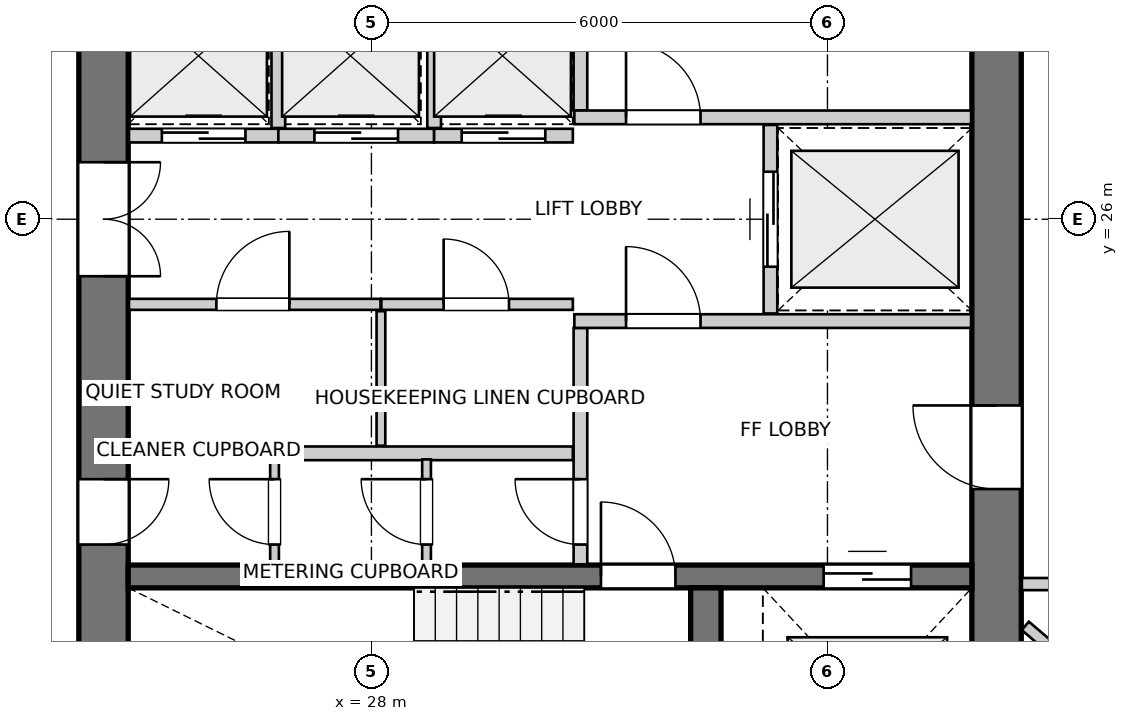
"""IFC4 building model, lengths in metres.
Left out: names, types, materials, properties, quantities, classifications, styles, units other than length and angle.
Written with IfcOpenShell. Run it as: python <this file> out.ifc"""

import sys

from ifc_helpers import new_model, si_unit, direction, frame, frame_2d, origin, place, context, subcontext, project, spatial, rectangle, extrude, source, transform, mapped, element, fill, save


model = new_model("IFC4")
c1 = context("Model", 3, precision=1e-05, world=origin(), true_north=direction((0.0, 1.0)))
c2 = subcontext(c1, "Body", "Model", "MODEL_VIEW")
j1 = project(units=[si_unit("LENGTHUNIT", "METRE"), si_unit("PLANEANGLEUNIT", "RADIAN")], contexts=[c1])
p1 = place(None, origin())
s1 = spatial("IfcSite", under=j1, at=p1, CompositionType="ELEMENT")
p2 = place(p1, origin())
s2 = spatial("IfcBuilding", under=s1, at=p2, CompositionType="ELEMENT")
p3 = place(p2, frame((0.0, 0.0, 187.4)))
s3 = spatial("IfcBuildingStorey", under=s2, at=p3, CompositionType="ELEMENT", Elevation=187.4)
p4 = place(p3, frame((24.475, 33.8, 0.0), z_axis=(0.0, 0.0, 1.0), x_axis=(0.0, -1.0, 0.0)))
e1 = element("IfcWall", 1, at=p4, inside=s3, PredefinedType="SHEAR", context=c2, shape_type="SweptSolid", body=[
    extrude(rectangle(XDim=15.6, YDim=0.65, at=frame_2d((7.8, 0.0))), origin(), (0.0, 0.0, 1.0), 2.9),
])
p5 = place(p4, frame((7.05, 0.0, 0.0)))
e2 = element("IfcOpeningElement", 2, at=p5, cuts=e1, PredefinedType="OPENING", context=c2, shape_type="SweptSolid", body=[
    extrude(rectangle(XDim=1.5, YDim=2.15, at=frame_2d((0.75, 1.075))), frame((0.0, 0.335, 0.0), z_axis=(0.0, -1.0, 0.0), x_axis=(1.0, 0.0, 0.0)), (0.0, 0.0, 1.0), 0.67),
])
p6 = place(p4, frame((3.52, 0.0, 0.0)))
e3 = element("IfcOpeningElement", 3, at=p6, cuts=e1, PredefinedType="OPENING", context=c2, shape_type="SweptSolid", body=[
    extrude(rectangle(XDim=0.86, YDim=2.05, at=frame_2d((0.43, 1.025))), frame((0.0, 0.335, 0.0), z_axis=(0.0, -1.0, 0.0), x_axis=(1.0, 0.0, 0.0)), (0.0, 0.0, 1.0), 0.67),
])
p7 = place(p4, frame((11.22, 0.0, 0.0)))
e4 = element("IfcOpeningElement", 4, at=p7, cuts=e1, PredefinedType="OPENING", context=c2, shape_type="SweptSolid", body=[
    extrude(rectangle(XDim=0.86, YDim=2.05, at=frame_2d((0.43, 1.025))), frame((0.0, 0.335, 0.0), z_axis=(0.0, -1.0, 0.0), x_axis=(1.0, 0.0, 0.0)), (0.0, 0.0, 1.0), 0.67),
])
p8 = place(p3, frame((36.225, 18.2, 0.0), z_axis=(0.0, 0.0, 1.0), x_axis=(0.0, 1.0, 0.0)))
e5 = element("IfcWall", 5, at=p8, inside=s3, PredefinedType="SHEAR", context=c2, shape_type="SweptSolid", body=[
    extrude(rectangle(XDim=15.6, YDim=0.65, at=frame_2d((7.8, 0.0))), origin(), (0.0, 0.0, 1.0), 2.9),
])
p9 = place(p8, frame((4.25, 0.0, 0.0)))
e6 = element("IfcOpeningElement", 6, at=p9, cuts=e5, PredefinedType="OPENING", context=c2, shape_type="SweptSolid", body=[
    extrude(rectangle(XDim=1.1, YDim=2.15, at=frame_2d((0.55, 1.075))), frame((0.0, 0.335, 0.0), z_axis=(0.0, -1.0, 0.0), x_axis=(1.0, 0.0, 0.0)), (0.0, 0.0, 1.0), 0.67),
])
p10 = place(p8, frame((10.25, 0.0, 0.0)))
e7 = element("IfcOpeningElement", 7, at=p10, cuts=e5, PredefinedType="OPENING", context=c2, shape_type="SweptSolid", body=[
    extrude(rectangle(XDim=1.1, YDim=2.15, at=frame_2d((0.55, 1.075))), frame((0.0, 0.335, 0.0), z_axis=(0.0, -1.0, 0.0), x_axis=(1.0, 0.0, 0.0)), (0.0, 0.0, 1.0), 0.67),
])
p11 = place(p3, frame((24.8, 21.3, 0.0), z_axis=(0.0, 0.0, 1.0), x_axis=(1.0, 0.0, 0.0)))
e8 = element("IfcWall", 8, at=p11, inside=s3, PredefinedType="SHEAR", context=c2, shape_type="SweptSolid", body=[
    extrude(rectangle(XDim=11.1, YDim=0.3, at=frame_2d((5.55, 0.0))), origin(), (0.0, 0.0, 1.0), 2.9),
])
p12 = place(p11, frame((6.22, 0.0, 0.0)))
e9 = element("IfcOpeningElement", 9, at=p12, cuts=e8, PredefinedType="OPENING", context=c2, shape_type="SweptSolid", body=[
    extrude(rectangle(XDim=0.98, YDim=2.15, at=frame_2d((0.49, 1.075))), frame((0.0, 0.16, 0.0), z_axis=(0.0, -1.0, 0.0), x_axis=(1.0, 0.0, 0.0)), (0.0, 0.0, 1.0), 0.32),
])
p13 = place(p11, frame((9.15, 0.0, 0.0)))
e10 = element("IfcOpeningElement", 10, at=p13, cuts=e8, PredefinedType="OPENING", context=c2, shape_type="SweptSolid", body=[
    extrude(rectangle(XDim=1.15, YDim=2.15, at=frame_2d((0.575, 1.075))), frame((0.0, 0.16, 0.0), z_axis=(0.0, -1.0, 0.0), x_axis=(1.0, 0.0, 0.0)), (0.0, 0.0, 1.0), 0.32),
])
p14 = place(p3, frame((32.4, 18.2, 0.0), z_axis=(0.0, 0.0, 1.0), x_axis=(0.0, 1.0, 0.0)))
e11 = element("IfcWall", 11, at=p14, inside=s3, PredefinedType="SHEAR", context=c2, shape_type="SweptSolid", body=[
    extrude(rectangle(XDim=2.95, YDim=0.4, at=frame_2d((1.475, 0.0))), origin(), (0.0, 0.0, 1.0), 2.9),
])
p15 = place(p3, frame((30.75, 21.46, 0.0), z_axis=(0.0, 0.0, 1.0), x_axis=(0.0, 1.0, 0.0)))
e12 = element("IfcWall", 12, at=p15, inside=s3, PredefinedType="PARTITIONING", context=c2, shape_type="SweptSolid", body=[
    extrude(rectangle(XDim=3.11, YDim=0.18, at=frame_2d((1.555, 0.0))), origin(), (0.0, 0.0, 1.0), 2.9),
])
p16 = place(p15, frame((0.26, 0.0, 0.0)))
e13 = element("IfcOpeningElement", 13, at=p16, cuts=e12, PredefinedType="OPENING", context=c2, shape_type="SweptSolid", body=[
    extrude(rectangle(XDim=0.86, YDim=2.05, at=frame_2d((0.43, 1.025))), frame((0.0, 0.1, 0.0), z_axis=(0.0, -1.0, 0.0), x_axis=(1.0, 0.0, 0.0)), (0.0, 0.0, 1.0), 0.2),
])
p17 = place(p3, frame((30.67, 24.66, 0.0), z_axis=(0.0, 0.0, 1.0), x_axis=(1.0, 0.0, 0.0)))
e14 = element("IfcWall", 14, at=p17, inside=s3, PredefinedType="PARTITIONING", context=c2, shape_type="SweptSolid", body=[
    extrude(rectangle(XDim=5.22, YDim=0.18, at=frame_2d((2.61, 0.0))), origin(), (0.0, 0.0, 1.0), 2.9),
])
p18 = place(p17, frame((0.68, 0.0, 0.0)))
e15 = element("IfcOpeningElement", 15, at=p18, cuts=e14, PredefinedType="OPENING", context=c2, shape_type="SweptSolid", body=[
    extrude(rectangle(XDim=0.98, YDim=2.15, at=frame_2d((0.49, 1.075))), frame((0.0, 0.1, 0.0), z_axis=(0.0, -1.0, 0.0), x_axis=(1.0, 0.0, 0.0)), (0.0, 0.0, 1.0), 0.2),
])
p19 = place(p3, frame((30.75, 27.43, 0.0), z_axis=(0.0, 0.0, 1.0), x_axis=(0.0, 1.0, 0.0)))
e16 = element("IfcWall", 16, at=p19, inside=s3, PredefinedType="PARTITIONING", context=c2, shape_type="SweptSolid", body=[
    extrude(rectangle(XDim=3.11, YDim=0.18, at=frame_2d((1.555, 0.0))), origin(), (0.0, 0.0, 1.0), 2.9),
])
p20 = place(p19, frame((1.98, 0.0, 0.0)))
e17 = element("IfcOpeningElement", 17, at=p20, cuts=e16, PredefinedType="OPENING", context=c2, shape_type="SweptSolid", body=[
    extrude(rectangle(XDim=0.86, YDim=2.05, at=frame_2d((0.43, 1.025))), frame((0.0, 0.1, 0.0), z_axis=(0.0, -1.0, 0.0), x_axis=(1.0, 0.0, 0.0)), (0.0, 0.0, 1.0), 0.2),
])
p21 = place(p3, frame((30.67, 27.34, 0.0), z_axis=(0.0, 0.0, 1.0), x_axis=(1.0, 0.0, 0.0)))
e18 = element("IfcWall", 18, at=p21, inside=s3, PredefinedType="PARTITIONING", context=c2, shape_type="SweptSolid", body=[
    extrude(rectangle(XDim=5.22, YDim=0.18, at=frame_2d((2.61, 0.0))), origin(), (0.0, 0.0, 1.0), 2.9),
])
p22 = place(p21, frame((0.68, 0.0, 0.0)))
e19 = element("IfcOpeningElement", 19, at=p22, cuts=e18, PredefinedType="OPENING", context=c2, shape_type="SweptSolid", body=[
    extrude(rectangle(XDim=0.98, YDim=2.15, at=frame_2d((0.49, 1.075))), frame((0.0, 0.1, 0.0), z_axis=(0.0, -1.0, 0.0), x_axis=(1.0, 0.0, 0.0)), (0.0, 0.0, 1.0), 0.2),
])
p23 = place(p3, frame((33.25, 24.76, 0.0), z_axis=(0.0, 0.0, 1.0), x_axis=(0.0, 1.0, 0.0)))
e20 = element("IfcWall", 20, at=p23, inside=s3, PredefinedType="PARTITIONING", context=c2, shape_type="SweptSolid", body=[
    extrude(rectangle(XDim=2.48, YDim=0.18, at=frame_2d((1.24, 0.0))), origin(), (0.0, 0.0, 1.0), 2.9),
])
p24 = place(p23, frame((0.615, 0.0, 0.0)))
e21 = element("IfcOpeningElement", 21, at=p24, cuts=e20, PredefinedType="OPENING", context=c2, shape_type="SweptSolid", body=[
    extrude(rectangle(XDim=1.25, YDim=2.15, at=frame_2d((0.625, 1.075))), frame((0.0, 0.1, 0.0), z_axis=(0.0, -1.0, 0.0), x_axis=(1.0, 0.0, 0.0)), (0.0, 0.0, 1.0), 0.2),
])
p25 = place(p3, frame((24.81, 22.92, 0.0), z_axis=(0.0, 0.0, 1.0), x_axis=(1.0, 0.0, 0.0)))
e22 = element("IfcWall", 22, at=p25, inside=s3, PredefinedType="PARTITIONING", context=c2, shape_type="SweptSolid", body=[
    extrude(rectangle(XDim=5.84, YDim=0.18, at=frame_2d((2.92, 0.0))), origin(), (0.0, 0.0, 1.0), 2.9),
])
p26 = place(p3, frame((24.81, 24.88, 0.0), z_axis=(0.0, 0.0, 1.0), x_axis=(1.0, 0.0, 0.0)))
e23 = element("IfcWall", 23, at=p26, inside=s3, PredefinedType="PARTITIONING", context=c2, shape_type="SweptSolid", body=[
    extrude(rectangle(XDim=3.31, YDim=0.145, at=frame_2d((1.655, 0.0))), origin(), (0.0, 0.0, 1.0), 2.9),
])
p27 = place(p26, frame((1.15, 0.0, 0.0)))
e24 = element("IfcOpeningElement", 24, at=p27, cuts=e23, PredefinedType="OPENING", context=c2, shape_type="SweptSolid", body=[
    extrude(rectangle(XDim=0.96, YDim=2.1, at=frame_2d((0.48, 1.05))), frame((0.0, 0.083, 0.0), z_axis=(0.0, -1.0, 0.0), x_axis=(1.0, 0.0, 0.0)), (0.0, 0.0, 1.0), 0.165),
])
p28 = place(p3, frame((28.13, 24.88, 0.0), z_axis=(0.0, 0.0, 1.0), x_axis=(1.0, 0.0, 0.0)))
e25 = element("IfcWall", 25, at=p28, inside=s3, PredefinedType="PARTITIONING", context=c2, shape_type="SweptSolid", body=[
    extrude(rectangle(XDim=2.52, YDim=0.145, at=frame_2d((1.26, 0.0))), origin(), (0.0, 0.0, 1.0), 2.9),
])
p29 = place(p28, frame((0.82, 0.0, 0.0)))
e26 = element("IfcOpeningElement", 26, at=p29, cuts=e25, PredefinedType="OPENING", context=c2, shape_type="SweptSolid", body=[
    extrude(rectangle(XDim=0.86, YDim=2.05, at=frame_2d((0.43, 1.025))), frame((0.0, 0.083, 0.0), z_axis=(0.0, -1.0, 0.0), x_axis=(1.0, 0.0, 0.0)), (0.0, 0.0, 1.0), 0.165),
])
p30 = place(p3, frame((28.125, 23.02, 0.0), z_axis=(0.0, 0.0, 1.0), x_axis=(0.0, 1.0, 0.0)))
e27 = element("IfcWall", 27, at=p30, inside=s3, PredefinedType="PARTITIONING", context=c2, shape_type="SweptSolid", body=[
    extrude(rectangle(XDim=1.77, YDim=0.115, at=frame_2d((0.885, 0.0))), origin(), (0.0, 0.0, 1.0), 2.9),
])
p31 = place(p3, frame((24.81, 27.1, 0.0), z_axis=(0.0, 0.0, 1.0), x_axis=(1.0, 0.0, 0.0)))
e28 = element("IfcWall", 28, at=p31, inside=s3, PredefinedType="PARTITIONING", context=c2, shape_type="SweptSolid", body=[
    extrude(rectangle(XDim=1.965, YDim=0.18, at=frame_2d((0.982, 0.0))), origin(), (0.0, 0.0, 1.0), 2.9),
])
p32 = place(p31, frame((0.433, 0.0, 0.0)))
e29 = element("IfcOpeningElement", 29, at=p32, cuts=e28, PredefinedType="OPENING", context=c2, shape_type="SweptSolid", body=[
    extrude(rectangle(XDim=1.1, YDim=2.15, at=frame_2d((0.55, 1.075))), frame((0.0, 0.1, 0.0), z_axis=(0.0, -1.0, 0.0), x_axis=(1.0, 0.0, 0.0)), (0.0, 0.0, 1.0), 0.2),
])
p33 = place(p3, frame((26.775, 27.1, 0.0), z_axis=(0.0, 0.0, 1.0), x_axis=(1.0, 0.0, 0.0)))
e30 = element("IfcWall", 30, at=p33, inside=s3, PredefinedType="PARTITIONING", context=c2, shape_type="SweptSolid", body=[
    extrude(rectangle(XDim=2.05, YDim=0.18, at=frame_2d((1.025, 0.0))), origin(), (0.0, 0.0, 1.0), 2.9),
])
p34 = place(p33, frame((0.475, 0.0, 0.0)))
e31 = element("IfcOpeningElement", 31, at=p34, cuts=e30, PredefinedType="OPENING", context=c2, shape_type="SweptSolid", body=[
    extrude(rectangle(XDim=1.1, YDim=2.15, at=frame_2d((0.55, 1.075))), frame((0.0, 0.1, 0.0), z_axis=(0.0, -1.0, 0.0), x_axis=(1.0, 0.0, 0.0)), (0.0, 0.0, 1.0), 0.2),
])
p35 = place(p3, frame((26.775, 27.2, 0.0), z_axis=(0.0, 0.0, 1.0), x_axis=(0.0, 1.0, 0.0)))
e32 = element("IfcWall", 32, at=p35, inside=s3, PredefinedType="PARTITIONING", context=c2, shape_type="SweptSolid", body=[
    extrude(rectangle(XDim=1.78, YDim=0.18, at=frame_2d((0.89, 0.0))), origin(), (0.0, 0.0, 1.0), 2.9),
])
p36 = place(p3, frame((28.825, 27.1, 0.0), z_axis=(0.0, 0.0, 1.0), x_axis=(1.0, 0.0, 0.0)))
e33 = element("IfcWall", 33, at=p36, inside=s3, PredefinedType="PARTITIONING", context=c2, shape_type="SweptSolid", body=[
    extrude(rectangle(XDim=1.825, YDim=0.18, at=frame_2d((0.913, 0.0))), origin(), (0.0, 0.0, 1.0), 2.9),
])
p37 = place(p36, frame((0.363, 0.0, 0.0)))
e34 = element("IfcOpeningElement", 34, at=p37, cuts=e33, PredefinedType="OPENING", context=c2, shape_type="SweptSolid", body=[
    extrude(rectangle(XDim=1.1, YDim=2.15, at=frame_2d((0.55, 1.075))), frame((0.0, 0.1, 0.0), z_axis=(0.0, -1.0, 0.0), x_axis=(1.0, 0.0, 0.0)), (0.0, 0.0, 1.0), 0.2),
])
p38 = place(p3, frame((28.825, 27.2, 0.0), z_axis=(0.0, 0.0, 1.0), x_axis=(0.0, 1.0, 0.0)))
e35 = element("IfcWall", 35, at=p38, inside=s3, PredefinedType="PARTITIONING", context=c2, shape_type="SweptSolid", body=[
    extrude(rectangle(XDim=1.78, YDim=0.18, at=frame_2d((0.89, 0.0))), origin(), (0.0, 0.0, 1.0), 2.9),
])
p39 = place(p3, frame((26.725, 21.46, 0.0), z_axis=(0.0, 0.0, 1.0), x_axis=(0.0, 1.0, 0.0)))
e36 = element("IfcWall", 36, at=p39, inside=s3, PredefinedType="PARTITIONING", context=c2, shape_type="SweptSolid", body=[
    extrude(rectangle(XDim=1.38, YDim=0.115, at=frame_2d((0.69, 0.0))), origin(), (0.0, 0.0, 1.0), 2.9),
])
p40 = place(p39, frame((0.26, 0.0, 0.0)))
e37 = element("IfcOpeningElement", 37, at=p40, cuts=e36, PredefinedType="OPENING", context=c2, shape_type="SweptSolid", body=[
    extrude(rectangle(XDim=0.86, YDim=2.05, at=frame_2d((0.43, 1.025))), frame((0.0, 0.067, 0.0), z_axis=(0.0, -1.0, 0.0), x_axis=(1.0, 0.0, 0.0)), (0.0, 0.0, 1.0), 0.135),
])
p41 = place(p3, frame((28.725, 21.46, 0.0), z_axis=(0.0, 0.0, 1.0), x_axis=(0.0, 1.0, 0.0)))
e38 = element("IfcWall", 38, at=p41, inside=s3, PredefinedType="PARTITIONING", context=c2, shape_type="SweptSolid", body=[
    extrude(rectangle(XDim=1.38, YDim=0.115, at=frame_2d((0.69, 0.0))), origin(), (0.0, 0.0, 1.0), 2.9),
])
p42 = place(p41, frame((0.26, 0.0, 0.0)))
e39 = element("IfcOpeningElement", 39, at=p42, cuts=e38, PredefinedType="OPENING", context=c2, shape_type="SweptSolid", body=[
    extrude(rectangle(XDim=0.86, YDim=2.05, at=frame_2d((0.43, 1.025))), frame((0.0, 0.067, 0.0), z_axis=(0.0, -1.0, 0.0), x_axis=(1.0, 0.0, 0.0)), (0.0, 0.0, 1.0), 0.135),
])
p43 = place(p3, frame((38.33, 21.2, 0.0), z_axis=(0.0, 0.0, 1.0), x_axis=(-1.0, 0.0, 0.0)))
e40 = element("IfcWall", 40, at=p43, inside=s3, PredefinedType="PARTITIONING", context=c2, shape_type="SweptSolid", body=[
    extrude(rectangle(XDim=1.772, YDim=0.16, at=frame_2d((0.886, 0.0))), origin(), (0.0, 0.0, 1.0), 2.9),
])
p44 = place(p43, frame((0.41, 0.0, 0.0)))
e41 = element("IfcOpeningElement", 41, at=p44, cuts=e40, PredefinedType="OPENING", context=c2, shape_type="SweptSolid", body=[
    extrude(rectangle(XDim=0.96, YDim=2.1, at=frame_2d((0.48, 1.05))), frame((0.0, 0.09, 0.0), z_axis=(0.0, -1.0, 0.0), x_axis=(1.0, 0.0, 0.0)), (0.0, 0.0, 1.0), 0.18),
])
p45 = place(p3, frame((36.603, 20.65, 0.0), z_axis=(0.0, 0.0, 1.0), x_axis=(0.759924803985, -0.650010993975, 0.0)))
e42 = element("IfcWall", 42, at=p45, inside=s3, PredefinedType="PARTITIONING", context=c2, shape_type="SweptSolid", body=[
    extrude(rectangle(XDim=7.294, YDim=0.145, at=frame_2d((3.647, 0.0))), origin(), (0.0, 0.0, 1.0), 2.9),
])
m1 = source(origin(), c2, "Body", "SweptSolid", [
    extrude(rectangle(XDim=0.98, YDim=2.15, at=frame_2d((0.49, 1.075))), frame((0.0, 0.025, 0.0), z_axis=(0.0, -1.0, 0.0), x_axis=(1.0, 0.0, 0.0)), (0.0, 0.0, 1.0), 0.05),
])
p46 = place(p12, origin())
e43 = element("IfcDoor", 43, at=p46, inside=s3, OperationType="SINGLE_SWING_LEFT", PredefinedType="DOOR", context=c2, shape_type="MappedRepresentation", body=[
    mapped(m1, transform((0.0, 0.0, 0.0), x_axis=(1.0, 0.0, 0.0), y_axis=(0.0, 1.0, 0.0), z_axis=(0.0, 0.0, 1.0), scale=1.0)),
])
fill(e9, e43)
m2 = source(origin(), c2, "Body", "SweptSolid", [
    extrude(rectangle(XDim=1.15, YDim=2.15, at=frame_2d((0.575, 1.075))), frame((0.0, 0.025, 0.0), z_axis=(0.0, -1.0, 0.0), x_axis=(1.0, 0.0, 0.0)), (0.0, 0.0, 1.0), 0.05),
])
p47 = place(p13, origin())
e44 = element("IfcDoor", 44, at=p47, inside=s3, OperationType="DOUBLE_DOOR_SLIDING", PredefinedType="DOOR", context=c2, shape_type="MappedRepresentation", body=[
    mapped(m2, transform((0.0, 0.0, 0.0), x_axis=(1.0, 0.0, 0.0), y_axis=(0.0, 1.0, 0.0), z_axis=(0.0, 0.0, 1.0), scale=1.0)),
])
fill(e10, e44)
m3 = source(origin(), c2, "Body", "SweptSolid", [
    extrude(rectangle(XDim=1.1, YDim=2.15, at=frame_2d((0.55, 1.075))), frame((0.0, 0.025, 0.0), z_axis=(0.0, -1.0, 0.0), x_axis=(1.0, 0.0, 0.0)), (0.0, 0.0, 1.0), 0.05),
])
p48 = place(p9, origin())
e45 = element("IfcDoor", 45, at=p48, inside=s3, OperationType="SINGLE_SWING_RIGHT", PredefinedType="DOOR", context=c2, shape_type="MappedRepresentation", body=[
    mapped(m3, transform((0.0, 0.0, 0.0), x_axis=(1.0, 0.0, 0.0), y_axis=(0.0, 1.0, 0.0), z_axis=(0.0, 0.0, 1.0), scale=1.0)),
])
fill(e6, e45)
m4 = source(origin(), c2, "Body", "SweptSolid", [
    extrude(rectangle(XDim=1.5, YDim=2.15, at=frame_2d((0.75, 1.075))), frame((0.0, 0.025, 0.0), z_axis=(0.0, -1.0, 0.0), x_axis=(1.0, 0.0, 0.0)), (0.0, 0.0, 1.0), 0.05),
])
p49 = place(p5, origin())
e46 = element("IfcDoor", 46, at=p49, inside=s3, OperationType="DOUBLE_DOOR_SINGLE_SWING", PredefinedType="DOOR", context=c2, shape_type="MappedRepresentation", body=[
    mapped(m4, transform((0.0, 0.0, 0.0), x_axis=(1.0, 0.0, 0.0), y_axis=(0.0, 1.0, 0.0), z_axis=(0.0, 0.0, 1.0), scale=1.0)),
])
fill(e2, e46)
m5 = source(origin(), c2, "Body", "SweptSolid", [
    extrude(rectangle(XDim=0.86, YDim=2.05, at=frame_2d((0.43, 1.025))), frame((0.0, 0.025, 0.0), z_axis=(0.0, -1.0, 0.0), x_axis=(1.0, 0.0, 0.0)), (0.0, 0.0, 1.0), 0.05),
])
p50 = place(p7, origin())
e47 = element("IfcDoor", 47, at=p50, inside=s3, OperationType="SINGLE_SWING_LEFT", PredefinedType="DOOR", context=c2, shape_type="MappedRepresentation", body=[
    mapped(m5, transform((0.0, 0.0, 0.0), x_axis=(1.0, 0.0, 0.0), y_axis=(0.0, 1.0, 0.0), z_axis=(0.0, 0.0, 1.0), scale=1.0)),
])
fill(e4, e47)
p51 = place(p16, origin())
e48 = element("IfcDoor", 48, at=p51, inside=s3, OperationType="SINGLE_SWING_RIGHT", PredefinedType="DOOR", context=c2, shape_type="MappedRepresentation", body=[
    mapped(m5, transform((0.0, 0.0, 0.0), x_axis=(1.0, 0.0, 0.0), y_axis=(0.0, 1.0, 0.0), z_axis=(0.0, 0.0, 1.0), scale=1.0)),
])
fill(e13, e48)
p52 = place(p18, origin())
e49 = element("IfcDoor", 49, at=p52, inside=s3, OperationType="SINGLE_SWING_LEFT", PredefinedType="DOOR", context=c2, shape_type="MappedRepresentation", body=[
    mapped(m1, transform((0.0, 0.0, 0.0), x_axis=(1.0, 0.0, 0.0), y_axis=(0.0, 1.0, 0.0), z_axis=(0.0, 0.0, 1.0), scale=1.0)),
])
fill(e15, e49)
p53 = place(p22, origin())
e50 = element("IfcDoor", 50, at=p53, inside=s3, OperationType="SINGLE_SWING_LEFT", PredefinedType="DOOR", context=c2, shape_type="MappedRepresentation", body=[
    mapped(m1, transform((0.0, 0.0, 0.0), x_axis=(1.0, 0.0, 0.0), y_axis=(0.0, 1.0, 0.0), z_axis=(0.0, 0.0, 1.0), scale=1.0)),
])
fill(e19, e50)
m6 = source(origin(), c2, "Body", "SweptSolid", [
    extrude(rectangle(XDim=1.25, YDim=2.15, at=frame_2d((0.625, 1.075))), frame((0.0, 0.025, 0.0), z_axis=(0.0, -1.0, 0.0), x_axis=(1.0, 0.0, 0.0)), (0.0, 0.0, 1.0), 0.05),
])
p54 = place(p24, origin())
e51 = element("IfcDoor", 51, at=p54, inside=s3, OperationType="DOUBLE_DOOR_SLIDING", PredefinedType="DOOR", context=c2, shape_type="MappedRepresentation", body=[
    mapped(m6, transform((0.0, 0.0, 0.0), x_axis=(1.0, 0.0, 0.0), y_axis=(0.0, 1.0, 0.0), z_axis=(0.0, 0.0, 1.0), scale=1.0)),
])
fill(e21, e51)
m7 = source(origin(), c2, "Body", "SweptSolid", [
    extrude(rectangle(XDim=0.96, YDim=2.1, at=frame_2d((0.48, 1.05))), frame((0.0, 0.025, 0.0), z_axis=(0.0, -1.0, 0.0), x_axis=(1.0, 0.0, 0.0)), (0.0, 0.0, 1.0), 0.05),
])
p55 = place(p27, origin())
e52 = element("IfcDoor", 52, at=p55, inside=s3, OperationType="SINGLE_SWING_RIGHT", PredefinedType="DOOR", context=c2, shape_type="MappedRepresentation", body=[
    mapped(m7, transform((0.0, 0.0, 0.0), x_axis=(1.0, 0.0, 0.0), y_axis=(0.0, 1.0, 0.0), z_axis=(0.0, 0.0, 1.0), scale=1.0)),
])
fill(e24, e52)
p56 = place(p29, origin())
e53 = element("IfcDoor", 53, at=p56, inside=s3, OperationType="SINGLE_SWING_LEFT", PredefinedType="DOOR", context=c2, shape_type="MappedRepresentation", body=[
    mapped(m5, transform((0.0, 0.0, 0.0), x_axis=(1.0, 0.0, 0.0), y_axis=(0.0, 1.0, 0.0), z_axis=(0.0, 0.0, 1.0), scale=1.0)),
])
fill(e26, e53)
p57 = place(p32, origin())
e54 = element("IfcDoor", 54, at=p57, inside=s3, OperationType="DOUBLE_DOOR_SLIDING", PredefinedType="DOOR", context=c2, shape_type="MappedRepresentation", body=[
    mapped(m3, transform((0.0, 0.0, 0.0), x_axis=(1.0, 0.0, 0.0), y_axis=(0.0, 1.0, 0.0), z_axis=(0.0, 0.0, 1.0), scale=1.0)),
])
fill(e29, e54)
p58 = place(p34, origin())
e55 = element("IfcDoor", 55, at=p58, inside=s3, OperationType="DOUBLE_DOOR_SLIDING", PredefinedType="DOOR", context=c2, shape_type="MappedRepresentation", body=[
    mapped(m3, transform((0.0, 0.0, 0.0), x_axis=(1.0, 0.0, 0.0), y_axis=(0.0, 1.0, 0.0), z_axis=(0.0, 0.0, 1.0), scale=1.0)),
])
fill(e31, e55)
p59 = place(p37, origin())
e56 = element("IfcDoor", 56, at=p59, inside=s3, OperationType="DOUBLE_DOOR_SLIDING", PredefinedType="DOOR", context=c2, shape_type="MappedRepresentation", body=[
    mapped(m3, transform((0.0, 0.0, 0.0), x_axis=(1.0, 0.0, 0.0), y_axis=(0.0, 1.0, 0.0), z_axis=(0.0, 0.0, 1.0), scale=1.0)),
])
fill(e34, e56)
p60 = place(p40, origin())
e57 = element("IfcDoor", 57, at=p60, inside=s3, OperationType="SINGLE_SWING_RIGHT", PredefinedType="DOOR", context=c2, shape_type="MappedRepresentation", body=[
    mapped(m5, transform((0.0, 0.0, 0.0), x_axis=(1.0, 0.0, 0.0), y_axis=(0.0, 1.0, 0.0), z_axis=(0.0, 0.0, 1.0), scale=1.0)),
])
fill(e37, e57)
p61 = place(p42, origin())
e58 = element("IfcDoor", 58, at=p61, inside=s3, OperationType="SINGLE_SWING_RIGHT", PredefinedType="DOOR", context=c2, shape_type="MappedRepresentation", body=[
    mapped(m5, transform((0.0, 0.0, 0.0), x_axis=(1.0, 0.0, 0.0), y_axis=(0.0, 1.0, 0.0), z_axis=(0.0, 0.0, 1.0), scale=1.0)),
])
fill(e39, e58)
save(model, sys.argv[1])
